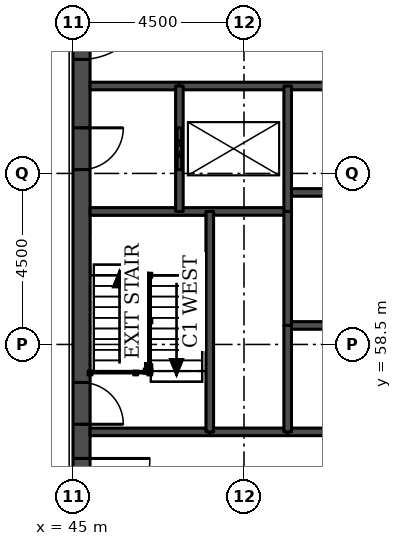
"""IFC4 building model, lengths in metres.
Left out: names, types, materials, properties, quantities, classifications, styles, units other than length and angle.
Written with IfcOpenShell. Run it as: python <this file> out.ifc"""

import sys

from ifc_helpers import new_model, si_unit, direction, frame, frame_2d, origin, place, context, subcontext, project, spatial, rectangle, extrude, element, fill, save


model = new_model("IFC4")
c1 = context("Model", 3, precision=1e-05, world=origin(), true_north=direction((0.0, 1.0)))
c2 = subcontext(c1, "Body", "Model", "MODEL_VIEW")
j1 = project(units=[si_unit("LENGTHUNIT", "METRE"), si_unit("PLANEANGLEUNIT", "RADIAN")], contexts=[c1])
p1 = place(None, origin())
s1 = spatial("IfcSite", under=j1, at=p1, CompositionType="ELEMENT")
p2 = place(p1, origin())
s2 = spatial("IfcBuilding", under=s1, at=p2, CompositionType="ELEMENT")
p3 = place(p2, frame((0.0, 0.0, 138.1)))
s3 = spatial("IfcBuildingStorey", under=s2, at=p3, CompositionType="ELEMENT", Elevation=138.1)
p4 = place(p3, frame((45.225, 49.5, 0.0), z_axis=(0.0, 0.0, 1.0), x_axis=(0.0, 1.0, 0.0)))
e1 = element("IfcWall", 1, at=p4, inside=s3, PredefinedType="SHEAR", context=c2, shape_type="SweptSolid", body=[
    extrude(rectangle(XDim=22.5, YDim=0.45, at=frame_2d((11.25, 0.0))), origin(), (0.0, 0.0, 1.0), 5.0),
])
p5 = place(p4, frame((4.2, 0.0, 0.0)))
e2 = element("IfcOpeningElement", 2, at=p5, cuts=e1, PredefinedType="OPENING", context=c2, shape_type="SweptSolid", body=[
    extrude(rectangle(XDim=1.8, YDim=2.1, at=frame_2d((0.9, 1.05))), frame((0.0, 0.235, 0.0), z_axis=(0.0, -1.0, 0.0), x_axis=(1.0, 0.0, 0.0)), (0.0, 0.0, 1.0), 0.47),
])
p6 = place(p4, frame((6.9, 0.0, 0.0)))
e3 = element("IfcOpeningElement", 3, at=p6, cuts=e1, PredefinedType="OPENING", context=c2, shape_type="SweptSolid", body=[
    extrude(rectangle(XDim=1.1, YDim=2.1, at=frame_2d((0.55, 1.05))), frame((0.0, 0.235, 0.0), z_axis=(0.0, -1.0, 0.0), x_axis=(1.0, 0.0, 0.0)), (0.0, 0.0, 1.0), 0.47),
])
p7 = place(p4, frame((13.6, 0.0, 0.0)))
e4 = element("IfcOpeningElement", 4, at=p7, cuts=e1, PredefinedType="OPENING", context=c2, shape_type="SweptSolid", body=[
    extrude(rectangle(XDim=1.1, YDim=2.1, at=frame_2d((0.55, 1.05))), frame((0.0, 0.235, 0.0), z_axis=(0.0, -1.0, 0.0), x_axis=(1.0, 0.0, 0.0)), (0.0, 0.0, 1.0), 0.47),
])
p8 = place(p4, frame((16.5, 0.0, 0.0)))
e5 = element("IfcOpeningElement", 5, at=p8, cuts=e1, PredefinedType="OPENING", context=c2, shape_type="SweptSolid", body=[
    extrude(rectangle(XDim=1.8, YDim=2.1, at=frame_2d((0.9, 1.05))), frame((0.0, 0.235, 0.0), z_axis=(0.0, -1.0, 0.0), x_axis=(1.0, 0.0, 0.0)), (0.0, 0.0, 1.0), 0.47),
])
p9 = place(p3, frame((48.6, 56.2, 0.0), z_axis=(0.0, 0.0, 1.0), x_axis=(1.0, 0.0, 0.0)))
e6 = element("IfcWall", 6, at=p9, inside=s3, PredefinedType="SOLIDWALL", context=c2, shape_type="SweptSolid", body=[
    extrude(rectangle(XDim=2.05, YDim=0.2, at=frame_2d((1.025, 0.0))), origin(), (0.0, 0.0, 1.0), 4.85),
])
p10 = place(p3, frame((45.45, 56.2, 0.0), z_axis=(0.0, 0.0, 1.0), x_axis=(1.0, 0.0, 0.0)))
e7 = element("IfcWall", 7, at=p10, inside=s3, PredefinedType="SOLIDWALL", context=c2, shape_type="SweptSolid", body=[
    extrude(rectangle(XDim=3.15, YDim=0.2, at=frame_2d((1.575, 0.0))), origin(), (0.0, 0.0, 1.0), 4.85),
])
p11 = place(p3, frame((50.65, 56.2, 0.0), z_axis=(0.0, 0.0, 1.0), x_axis=(1.0, 0.0, 0.0)))
e8 = element("IfcWall", 8, at=p11, inside=s3, PredefinedType="SOLIDWALL", context=c2, shape_type="SweptSolid", body=[
    extrude(rectangle(XDim=11.2, YDim=0.2, at=frame_2d((5.6, 0.0))), origin(), (0.0, 0.0, 1.0), 4.85),
])
p12 = place(p3, frame((50.65, 59.0, 0.0), z_axis=(0.0, 0.0, 1.0), x_axis=(1.0, 0.0, 0.0)))
e9 = element("IfcWall", 9, at=p12, inside=s3, PredefinedType="SOLIDWALL", context=c2, shape_type="SweptSolid", body=[
    extrude(rectangle(XDim=11.2, YDim=0.2, at=frame_2d((5.6, 0.0))), origin(), (0.0, 0.0, 1.0), 5.0),
])
p13 = place(p3, frame((45.45, 62.0, 0.0), z_axis=(0.0, 0.0, 1.0), x_axis=(1.0, 0.0, 0.0)))
e10 = element("IfcWall", 10, at=p13, inside=s3, PredefinedType="SOLIDWALL", context=c2, shape_type="SweptSolid", body=[
    extrude(rectangle(XDim=5.2, YDim=0.2, at=frame_2d((2.6, 0.0))), origin(), (0.0, 0.0, 1.0), 4.85),
])
p14 = place(p3, frame((50.65, 62.5, 0.0), z_axis=(0.0, 0.0, 1.0), x_axis=(1.0, 0.0, 0.0)))
e11 = element("IfcWall", 11, at=p14, inside=s3, PredefinedType="SOLIDWALL", context=c2, shape_type="SweptSolid", body=[
    extrude(rectangle(XDim=11.2, YDim=0.2, at=frame_2d((5.6, 0.0))), origin(), (0.0, 0.0, 1.0), 5.0),
])
p15 = place(p3, frame((45.45, 65.3, 0.0), z_axis=(0.0, 0.0, 1.0), x_axis=(1.0, 0.0, 0.0)))
e12 = element("IfcWall", 12, at=p15, inside=s3, PredefinedType="SOLIDWALL", context=c2, shape_type="SweptSolid", body=[
    extrude(rectangle(XDim=2.35, YDim=0.2, at=frame_2d((1.175, 0.0))), origin(), (0.0, 0.0, 1.0), 4.85),
])
p16 = place(p3, frame((47.8, 65.3, 0.0), z_axis=(0.0, 0.0, 1.0), x_axis=(1.0, 0.0, 0.0)))
e13 = element("IfcWall", 13, at=p16, inside=s3, PredefinedType="SOLIDWALL", context=c2, shape_type="SweptSolid", body=[
    extrude(rectangle(XDim=16.9, YDim=0.2, at=frame_2d((8.45, 0.0))), origin(), (0.0, 0.0, 1.0), 4.85),
])
p17 = place(p3, frame((47.8, 62.0, 0.0), z_axis=(0.0, 0.0, 1.0), x_axis=(0.0, 1.0, 0.0)))
e14 = element("IfcWall", 14, at=p17, inside=s3, PredefinedType="SOLIDWALL", context=c2, shape_type="SweptSolid", body=[
    extrude(rectangle(XDim=3.3, YDim=0.2, at=frame_2d((1.65, 0.0))), origin(), (0.0, 0.0, 1.0), 4.85),
])
p18 = place(p17, frame((1.1, 0.0, 0.0)))
e15 = element("IfcOpeningElement", 15, at=p18, cuts=e14, PredefinedType="OPENING", context=c2, shape_type="SweptSolid", body=[
    extrude(rectangle(XDim=1.1, YDim=2.1, at=frame_2d((0.55, 1.05))), frame((0.0, 0.11, 0.0), z_axis=(0.0, -1.0, 0.0), x_axis=(1.0, 0.0, 0.0)), (0.0, 0.0, 1.0), 0.22),
])
p19 = place(p3, frame((48.6, 56.2, 0.0), z_axis=(0.0, 0.0, 1.0), x_axis=(0.0, 1.0, 0.0)))
e16 = element("IfcWall", 16, at=p19, inside=s3, PredefinedType="SOLIDWALL", context=c2, shape_type="SweptSolid", body=[
    extrude(rectangle(XDim=5.8, YDim=0.2, at=frame_2d((2.9, 0.0))), origin(), (0.0, 0.0, 1.0), 4.85),
])
p20 = place(p3, frame((50.65, 59.0, 0.0), z_axis=(0.0, 0.0, 1.0), x_axis=(0.0, 1.0, 0.0)))
e17 = element("IfcWall", 17, at=p20, inside=s3, PredefinedType="SOLIDWALL", context=c2, shape_type="SweptSolid", body=[
    extrude(rectangle(XDim=3.0, YDim=0.2, at=frame_2d((1.5, 0.0))), origin(), (0.0, 0.0, 1.0), 5.0),
])
p21 = place(p3, frame((50.65, 56.2, 0.0), z_axis=(0.0, 0.0, 1.0), x_axis=(0.0, 1.0, 0.0)))
e18 = element("IfcWall", 18, at=p21, inside=s3, PredefinedType="SOLIDWALL", context=c2, shape_type="SweptSolid", body=[
    extrude(rectangle(XDim=2.8, YDim=0.2, at=frame_2d((1.4, 0.0))), origin(), (0.0, 0.0, 1.0), 4.85),
])
p22 = place(p3, frame((50.65, 62.0, 0.0), z_axis=(0.0, 0.0, 1.0), x_axis=(0.0, 1.0, 0.0)))
e19 = element("IfcWall", 19, at=p22, inside=s3, PredefinedType="SOLIDWALL", context=c2, shape_type="SweptSolid", body=[
    extrude(rectangle(XDim=3.3, YDim=0.2, at=frame_2d((1.65, 0.0))), origin(), (0.0, 0.0, 1.0), 4.85),
])
p23 = place(p18, origin())
e20 = element("IfcDoor", 20, at=p23, inside=s3, OperationType="DOUBLE_DOOR_SLIDING", PredefinedType="DOOR", context=c2, shape_type="SweptSolid", body=[
    extrude(rectangle(XDim=1.1, YDim=2.1, at=frame_2d((0.55, 1.05))), frame((0.0, 0.025, 0.0), z_axis=(0.0, -1.0, 0.0), x_axis=(1.0, 0.0, 0.0)), (0.0, 0.0, 1.0), 0.05),
])
fill(e15, e20)
p24 = place(p5, frame((1.8, 0.0, 0.0), z_axis=(0.0, 0.0, 1.0), x_axis=(-1.0, 0.0, 0.0)))
e21 = element("IfcDoor", 21, at=p24, inside=s3, OperationType="SINGLE_SWING_LEFT", PredefinedType="DOOR", context=c2, shape_type="SweptSolid", body=[
    extrude(rectangle(XDim=1.8, YDim=2.1, at=frame_2d((0.9, 1.05))), frame((0.0, 0.025, 0.0), z_axis=(0.0, -1.0, 0.0), x_axis=(1.0, 0.0, 0.0)), (0.0, 0.0, 1.0), 0.05),
])
fill(e2, e21)
p25 = place(p6, frame((1.1, 0.0, 0.0), z_axis=(0.0, 0.0, 1.0), x_axis=(-1.0, 0.0, 0.0)))
e22 = element("IfcDoor", 22, at=p25, inside=s3, OperationType="SINGLE_SWING_RIGHT", PredefinedType="DOOR", context=c2, shape_type="SweptSolid", body=[
    extrude(rectangle(XDim=1.1, YDim=2.1, at=frame_2d((0.55, 1.05))), frame((0.0, 0.025, 0.0), z_axis=(0.0, -1.0, 0.0), x_axis=(1.0, 0.0, 0.0)), (0.0, 0.0, 1.0), 0.05),
])
fill(e3, e22)
p26 = place(p7, frame((1.1, 0.0, 0.0), z_axis=(0.0, 0.0, 1.0), x_axis=(-1.0, 0.0, 0.0)))
e23 = element("IfcDoor", 23, at=p26, inside=s3, OperationType="SINGLE_SWING_LEFT", PredefinedType="DOOR", context=c2, shape_type="SweptSolid", body=[
    extrude(rectangle(XDim=1.1, YDim=2.1, at=frame_2d((0.55, 1.05))), frame((0.0, 0.025, 0.0), z_axis=(0.0, -1.0, 0.0), x_axis=(1.0, 0.0, 0.0)), (0.0, 0.0, 1.0), 0.05),
])
fill(e4, e23)
p27 = place(p8, frame((1.8, 0.0, 0.0), z_axis=(0.0, 0.0, 1.0), x_axis=(-1.0, 0.0, 0.0)))
e24 = element("IfcDoor", 24, at=p27, inside=s3, OperationType="SINGLE_SWING_LEFT", PredefinedType="DOOR", context=c2, shape_type="SweptSolid", body=[
    extrude(rectangle(XDim=1.8, YDim=2.1, at=frame_2d((0.9, 1.05))), frame((0.0, 0.025, 0.0), z_axis=(0.0, -1.0, 0.0), x_axis=(1.0, 0.0, 0.0)), (0.0, 0.0, 1.0), 0.05),
])
fill(e5, e24)
save(model, sys.argv[1])
